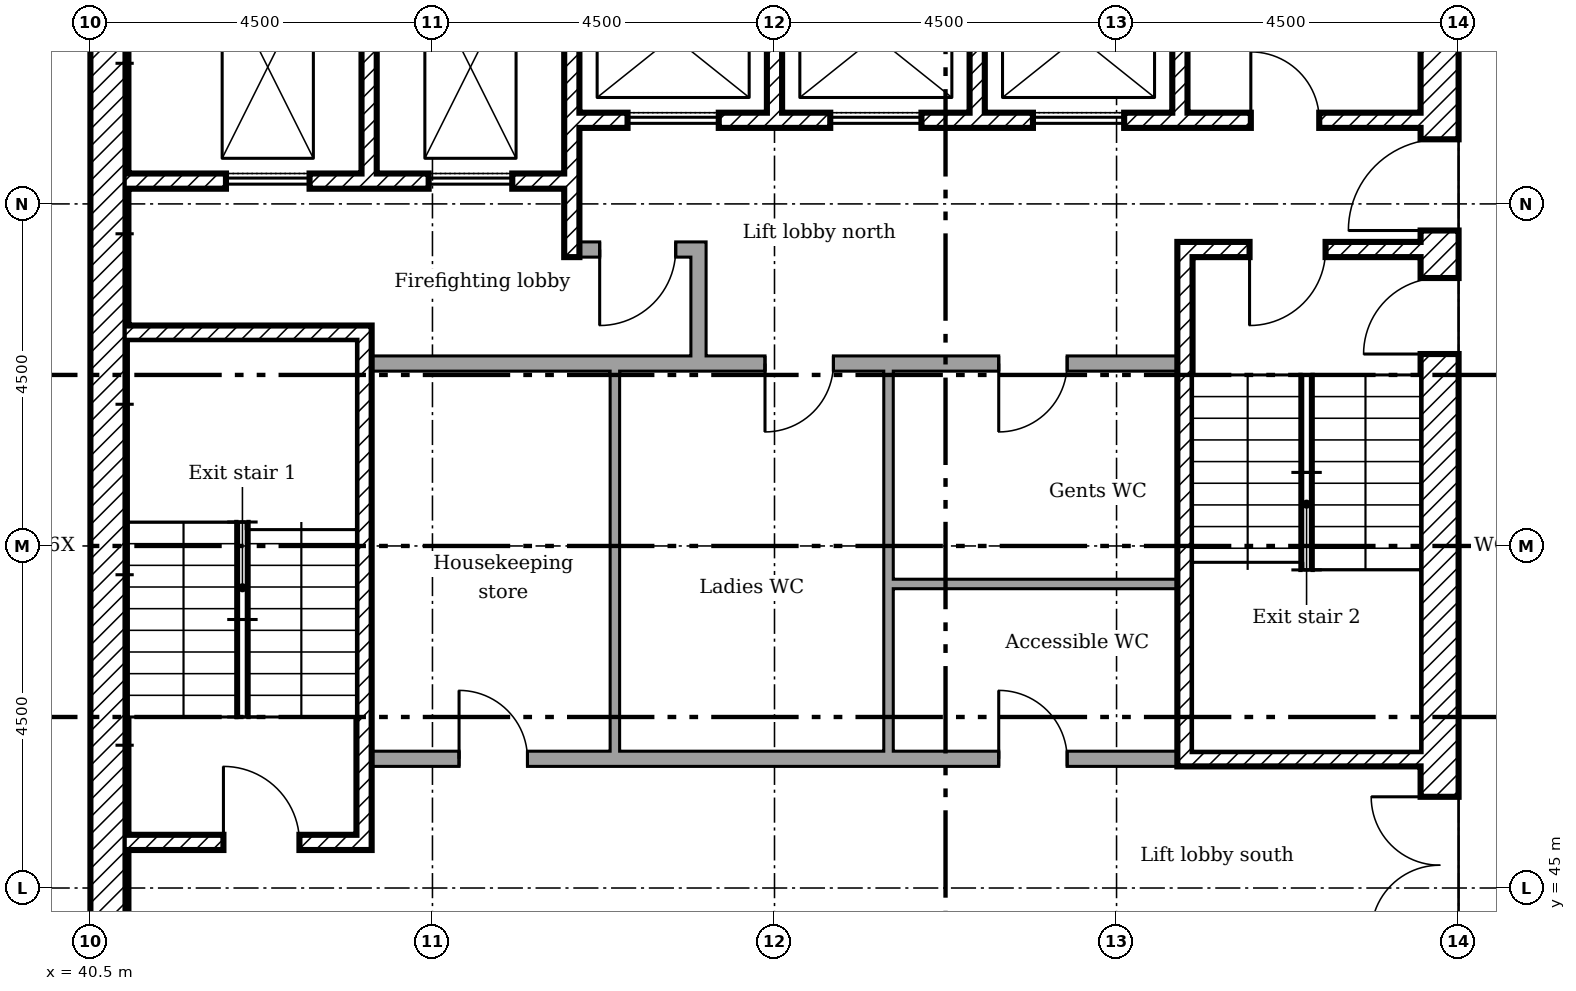
"""IFC4 building model, lengths in metres.
Left out: names, types, materials, properties, quantities, classifications, styles, units other than length and angle.
Written with IfcOpenShell. Run it as: python <this file> out.ifc"""

import sys

from ifc_helpers import new_model, si_unit, direction, frame, frame_2d, origin, place, context, subcontext, project, spatial, rectangle, extrude, element, fill, save


model = new_model("IFC4")
c1 = context("Model", 3, precision=1e-05, world=origin(), true_north=direction((0.0, 1.0)))
c2 = subcontext(c1, "Body", "Model", "MODEL_VIEW")
j1 = project(units=[si_unit("LENGTHUNIT", "METRE"), si_unit("PLANEANGLEUNIT", "RADIAN")], contexts=[c1])
p1 = place(None, origin())
s1 = spatial("IfcSite", under=j1, at=p1, CompositionType="ELEMENT")
p2 = place(p1, origin())
s2 = spatial("IfcBuilding", under=s1, at=p2, CompositionType="ELEMENT")
p3 = place(p2, frame((0.0, 0.0, 235.2)))
s3 = spatial("IfcBuildingStorey", under=s2, at=p3, CompositionType="ELEMENT", Elevation=235.2)
p4 = place(p3, frame((58.25, 40.5, 0.0), z_axis=(0.0, 0.0, 1.0), x_axis=(0.0, 1.0, 0.0)))
e1 = element("IfcWall", 1, at=p4, inside=s3, PredefinedType="SHEAR", context=c2, shape_type="SweptSolid", body=[
    extrude(rectangle(XDim=18.0, YDim=0.5, at=frame_2d((9.0, 0.0))), origin(), (0.0, 0.0, 1.0), 3.35),
])
p5 = place(p4, frame((13.15, 0.0, 0.0)))
e2 = element("IfcOpeningElement", 2, at=p5, cuts=e1, PredefinedType="OPENING", context=c2, shape_type="SweptSolid", body=[
    extrude(rectangle(XDim=1.2, YDim=2.1, at=frame_2d((0.6, 1.05))), frame((0.0, 0.26, 0.0), z_axis=(0.0, -1.0, 0.0), x_axis=(1.0, 0.0, 0.0)), (0.0, 0.0, 1.0), 0.52),
])
p6 = place(p4, frame((3.9, 0.0, 0.0)))
e3 = element("IfcOpeningElement", 3, at=p6, cuts=e1, PredefinedType="OPENING", context=c2, shape_type="SweptSolid", body=[
    extrude(rectangle(XDim=1.8, YDim=2.1, at=frame_2d((0.9, 1.05))), frame((0.0, 0.26, 0.0), z_axis=(0.0, -1.0, 0.0), x_axis=(1.0, 0.0, 0.0)), (0.0, 0.0, 1.0), 0.52),
])
p7 = place(p4, frame((11.525, 0.0, 0.0)))
e4 = element("IfcOpeningElement", 4, at=p7, cuts=e1, PredefinedType="OPENING", context=c2, shape_type="SweptSolid", body=[
    extrude(rectangle(XDim=1.0, YDim=2.1, at=frame_2d((0.5, 1.05))), frame((0.0, 0.26, 0.0), z_axis=(0.0, -1.0, 0.0), x_axis=(1.0, 0.0, 0.0)), (0.0, 0.0, 1.0), 0.52),
])
p8 = place(p3, frame((40.75, 41.0, 0.0), z_axis=(0.0, 0.0, 1.0), x_axis=(0.0, 1.0, 0.0)))
e5 = element("IfcWall", 5, at=p8, inside=s3, PredefinedType="SHEAR", context=c2, shape_type="SweptSolid", body=[
    extrude(rectangle(XDim=17.0, YDim=0.5, at=frame_2d((8.5, 0.0))), origin(), (0.0, 0.0, 1.0), 3.35),
])
p9 = place(p3, frame((44.167, 58.0, 0.0), z_axis=(0.0, 0.0, 1.0), x_axis=(0.0, -1.0, 0.0)))
e6 = element("IfcWall", 6, at=p9, inside=s3, PredefinedType="SHEAR", context=c2, shape_type="SweptSolid", body=[
    extrude(rectangle(XDim=3.6, YDim=0.2, at=frame_2d((1.8, 0.0))), origin(), (0.0, 0.0, 1.0), 3.35),
])
p10 = place(p3, frame((46.833, 58.0, 0.0), z_axis=(0.0, 0.0, 1.0), x_axis=(0.0, -1.0, 0.0)))
e7 = element("IfcWall", 7, at=p10, inside=s3, PredefinedType="SHEAR", context=c2, shape_type="SweptSolid", body=[
    extrude(rectangle(XDim=4.7, YDim=0.2, at=frame_2d((2.35, 0.0))), origin(), (0.0, 0.0, 1.0), 3.35),
])
for number, where, z_axis, x_axis in (
    (8, (49.5, 58.0, 0.0), (0.0, 0.0, 1.0), (0.0, -1.0, 0.0)),
    (9, (52.167, 58.0, 0.0), (0.0, 0.0, 1.0), (0.0, -1.0, 0.0)),
    (10, (54.833, 58.0, 0.0), (0.0, 0.0, 1.0), (0.0, -1.0, 0.0)),
):
    element("IfcWall", number, at=place(p3, frame(where, z_axis=z_axis, x_axis=x_axis)), inside=s3, PredefinedType="SHEAR", context=c2, shape_type="SweptSolid", body=[
        extrude(rectangle(XDim=2.8, YDim=0.2, at=frame_2d((1.4, 0.0))), origin(), (0.0, 0.0, 1.0), 3.35),
    ])
p11 = place(p3, frame((48.5, 51.9, 0.0), z_axis=(0.0, 0.0, 1.0), x_axis=(0.0, 1.0, 0.0)))
e11 = element("IfcWall", 11, at=p11, inside=s3, PredefinedType="PARTITIONING", context=c2, shape_type="SweptSolid", body=[
    extrude(rectangle(XDim=1.6, YDim=0.2, at=frame_2d((0.8, 0.0))), origin(), (0.0, 0.0, 1.0), 3.35),
])
p12 = place(p3, frame((46.933, 53.4, 0.0)))
e12 = element("IfcWall", 12, at=p12, inside=s3, PredefinedType="PARTITIONING", context=c2, shape_type="SweptSolid", body=[
    extrude(rectangle(XDim=1.467, YDim=0.2, at=frame_2d((0.733, 0.0))), origin(), (0.0, 0.0, 1.0), 3.35),
])
p13 = place(p12, frame((0.267, 0.0, 0.0)))
e13 = element("IfcOpeningElement", 13, at=p13, cuts=e12, PredefinedType="OPENING", context=c2, shape_type="SweptSolid", body=[
    extrude(rectangle(XDim=1.0, YDim=2.1, at=frame_2d((0.5, 1.05))), frame((0.0, 0.11, 0.0), z_axis=(0.0, -1.0, 0.0), x_axis=(1.0, 0.0, 0.0)), (0.0, 0.0, 1.0), 0.22),
])
p14 = place(p3, frame((46.933, 55.1, 0.0)))
e14 = element("IfcWall", 14, at=p14, inside=s3, PredefinedType="SHEAR", context=c2, shape_type="SweptSolid", body=[
    extrude(rectangle(XDim=11.067, YDim=0.2, at=frame_2d((5.533, 0.0))), origin(), (0.0, 0.0, 1.0), 3.35),
])
p15 = place(p14, frame((8.833, 0.0, 0.0)))
e15 = element("IfcOpeningElement", 15, at=p15, cuts=e14, PredefinedType="OPENING", context=c2, shape_type="SweptSolid", body=[
    extrude(rectangle(XDim=0.9, YDim=2.1, at=frame_2d((0.45, 1.05))), frame((0.0, 0.11, 0.0), z_axis=(0.0, -1.0, 0.0), x_axis=(1.0, 0.0, 0.0)), (0.0, 0.0, 1.0), 0.22),
])
p16 = place(p14, frame((0.633, 0.0, 0.0)))
e16 = element("IfcOpeningElement", 16, at=p16, cuts=e14, PredefinedType="OPENING", context=c2, shape_type="SweptSolid", body=[
    extrude(rectangle(XDim=1.2, YDim=2.1, at=frame_2d((0.6, 1.05))), frame((0.0, 0.11, 0.0), z_axis=(0.0, -1.0, 0.0), x_axis=(1.0, 0.0, 0.0)), (0.0, 0.0, 1.0), 0.22),
])
p17 = place(p14, frame((3.3, 0.0, 0.0)))
e17 = element("IfcOpeningElement", 17, at=p17, cuts=e14, PredefinedType="OPENING", context=c2, shape_type="SweptSolid", body=[
    extrude(rectangle(XDim=1.2, YDim=2.1, at=frame_2d((0.6, 1.05))), frame((0.0, 0.11, 0.0), z_axis=(0.0, -1.0, 0.0), x_axis=(1.0, 0.0, 0.0)), (0.0, 0.0, 1.0), 0.22),
])
p18 = place(p14, frame((5.967, 0.0, 0.0)))
e18 = element("IfcOpeningElement", 18, at=p18, cuts=e14, PredefinedType="OPENING", context=c2, shape_type="SweptSolid", body=[
    extrude(rectangle(XDim=1.2, YDim=2.1, at=frame_2d((0.6, 1.05))), frame((0.0, 0.11, 0.0), z_axis=(0.0, -1.0, 0.0), x_axis=(1.0, 0.0, 0.0)), (0.0, 0.0, 1.0), 0.22),
])
p19 = place(p3, frame((41.0, 54.3, 0.0)))
e19 = element("IfcWall", 19, at=p19, inside=s3, PredefinedType="SHEAR", context=c2, shape_type="SweptSolid", body=[
    extrude(rectangle(XDim=5.733, YDim=0.2, at=frame_2d((2.867, 0.0))), origin(), (0.0, 0.0, 1.0), 3.35),
])
p20 = place(p19, frame((1.283, 0.0, 0.0)))
e20 = element("IfcOpeningElement", 20, at=p20, cuts=e19, PredefinedType="OPENING", context=c2, shape_type="SweptSolid", body=[
    extrude(rectangle(XDim=1.1, YDim=2.1, at=frame_2d((0.55, 1.05))), frame((0.0, 0.11, 0.0), z_axis=(0.0, -1.0, 0.0), x_axis=(1.0, 0.0, 0.0)), (0.0, 0.0, 1.0), 0.22),
])
p21 = place(p19, frame((3.95, 0.0, 0.0)))
e21 = element("IfcOpeningElement", 21, at=p21, cuts=e19, PredefinedType="OPENING", context=c2, shape_type="SweptSolid", body=[
    extrude(rectangle(XDim=1.1, YDim=2.1, at=frame_2d((0.55, 1.05))), frame((0.0, 0.11, 0.0), z_axis=(0.0, -1.0, 0.0), x_axis=(1.0, 0.0, 0.0)), (0.0, 0.0, 1.0), 0.22),
])
p22 = place(p3, frame((44.1, 45.5, 0.0), z_axis=(0.0, 0.0, 1.0), x_axis=(0.0, 1.0, 0.0)))
e22 = element("IfcWall", 22, at=p22, inside=s3, PredefinedType="SHEAR", context=c2, shape_type="SweptSolid", body=[
    extrude(rectangle(XDim=6.9, YDim=0.2, at=frame_2d((3.45, 0.0))), origin(), (0.0, 0.0, 1.0), 3.35),
])
p23 = place(p3, frame((41.0, 52.3, 0.0)))
e23 = element("IfcWall", 23, at=p23, inside=s3, PredefinedType="SHEAR", context=c2, shape_type="SweptSolid", body=[
    extrude(rectangle(XDim=3.0, YDim=0.2, at=frame_2d((1.5, 0.0))), origin(), (0.0, 0.0, 1.0), 3.35),
])
p24 = place(p3, frame((41.0, 45.6, 0.0)))
e24 = element("IfcWall", 24, at=p24, inside=s3, PredefinedType="SHEAR", context=c2, shape_type="SweptSolid", body=[
    extrude(rectangle(XDim=3.0, YDim=0.2, at=frame_2d((1.5, 0.0))), origin(), (0.0, 0.0, 1.0), 3.35),
])
p25 = place(p24, frame((1.25, 0.0, 0.0)))
e25 = element("IfcOpeningElement", 25, at=p25, cuts=e24, PredefinedType="OPENING", context=c2, shape_type="SweptSolid", body=[
    extrude(rectangle(XDim=1.0, YDim=2.1, at=frame_2d((0.5, 1.05))), frame((0.0, 0.11, 0.0), z_axis=(0.0, -1.0, 0.0), x_axis=(1.0, 0.0, 0.0)), (0.0, 0.0, 1.0), 0.22),
])
p26 = place(p3, frame((54.8, 53.4, 0.0)))
e26 = element("IfcWall", 26, at=p26, inside=s3, PredefinedType="SHEAR", context=c2, shape_type="SweptSolid", body=[
    extrude(rectangle(XDim=3.2, YDim=0.2, at=frame_2d((1.6, 0.0))), origin(), (0.0, 0.0, 1.0), 3.35),
])
p27 = place(p26, frame((0.95, 0.0, 0.0)))
e27 = element("IfcOpeningElement", 27, at=p27, cuts=e26, PredefinedType="OPENING", context=c2, shape_type="SweptSolid", body=[
    extrude(rectangle(XDim=1.0, YDim=2.1, at=frame_2d((0.5, 1.05))), frame((0.0, 0.11, 0.0), z_axis=(0.0, -1.0, 0.0), x_axis=(1.0, 0.0, 0.0)), (0.0, 0.0, 1.0), 0.22),
])
p28 = place(p3, frame((54.8, 46.7, 0.0)))
e28 = element("IfcWall", 28, at=p28, inside=s3, PredefinedType="SHEAR", context=c2, shape_type="SweptSolid", body=[
    extrude(rectangle(XDim=3.2, YDim=0.2, at=frame_2d((1.6, 0.0))), origin(), (0.0, 0.0, 1.0), 3.35),
])
p29 = place(p3, frame((54.9, 46.8, 0.0), z_axis=(0.0, 0.0, 1.0), x_axis=(0.0, 1.0, 0.0)))
e29 = element("IfcWall", 29, at=p29, inside=s3, PredefinedType="SHEAR", context=c2, shape_type="SweptSolid", body=[
    extrude(rectangle(XDim=6.5, YDim=0.2, at=frame_2d((3.25, 0.0))), origin(), (0.0, 0.0, 1.0), 3.35),
])
p30 = place(p3, frame((44.2, 51.9, 0.0)))
e30 = element("IfcWall", 30, at=p30, inside=s3, PredefinedType="PARTITIONING", context=c2, shape_type="SweptSolid", body=[
    extrude(rectangle(XDim=10.6, YDim=0.2, at=frame_2d((5.3, 0.0))), origin(), (0.0, 0.0, 1.0), 3.35),
])
p31 = place(p30, frame((5.175, 0.0, 0.0)))
e31 = element("IfcOpeningElement", 31, at=p31, cuts=e30, PredefinedType="OPENING", context=c2, shape_type="SweptSolid", body=[
    extrude(rectangle(XDim=0.9, YDim=2.1, at=frame_2d((0.45, 1.05))), frame((0.0, 0.11, 0.0), z_axis=(0.0, -1.0, 0.0), x_axis=(1.0, 0.0, 0.0)), (0.0, 0.0, 1.0), 0.22),
])
p32 = place(p30, frame((8.25, 0.0, 0.0)))
e32 = element("IfcOpeningElement", 32, at=p32, cuts=e30, PredefinedType="OPENING", context=c2, shape_type="SweptSolid", body=[
    extrude(rectangle(XDim=0.9, YDim=2.1, at=frame_2d((0.45, 1.05))), frame((0.0, 0.11, 0.0), z_axis=(0.0, -1.0, 0.0), x_axis=(1.0, 0.0, 0.0)), (0.0, 0.0, 1.0), 0.22),
])
p33 = place(p3, frame((44.2, 46.7, 0.0)))
e33 = element("IfcWall", 33, at=p33, inside=s3, PredefinedType="PARTITIONING", context=c2, shape_type="SweptSolid", body=[
    extrude(rectangle(XDim=10.6, YDim=0.2, at=frame_2d((5.3, 0.0))), origin(), (0.0, 0.0, 1.0), 3.35),
])
p34 = place(p33, frame((1.15, 0.0, 0.0)))
e34 = element("IfcOpeningElement", 34, at=p34, cuts=e33, PredefinedType="OPENING", context=c2, shape_type="SweptSolid", body=[
    extrude(rectangle(XDim=0.9, YDim=2.1, at=frame_2d((0.45, 1.05))), frame((0.0, 0.11, 0.0), z_axis=(0.0, -1.0, 0.0), x_axis=(1.0, 0.0, 0.0)), (0.0, 0.0, 1.0), 0.22),
])
p35 = place(p33, frame((8.25, 0.0, 0.0)))
e35 = element("IfcOpeningElement", 35, at=p35, cuts=e33, PredefinedType="OPENING", context=c2, shape_type="SweptSolid", body=[
    extrude(rectangle(XDim=0.9, YDim=2.1, at=frame_2d((0.45, 1.05))), frame((0.0, 0.11, 0.0), z_axis=(0.0, -1.0, 0.0), x_axis=(1.0, 0.0, 0.0)), (0.0, 0.0, 1.0), 0.22),
])
p36 = place(p3, frame((47.4, 46.8, 0.0), z_axis=(0.0, 0.0, 1.0), x_axis=(0.0, 1.0, 0.0)))
e36 = element("IfcWall", 36, at=p36, inside=s3, PredefinedType="PARTITIONING", context=c2, shape_type="SweptSolid", body=[
    extrude(rectangle(XDim=5.0, YDim=0.125, at=frame_2d((2.5, 0.0))), origin(), (0.0, 0.0, 1.0), 3.35),
])
p37 = place(p3, frame((51.0, 46.8, 0.0), z_axis=(0.0, 0.0, 1.0), x_axis=(0.0, 1.0, 0.0)))
e37 = element("IfcWall", 37, at=p37, inside=s3, PredefinedType="PARTITIONING", context=c2, shape_type="SweptSolid", body=[
    extrude(rectangle(XDim=2.262, YDim=0.125, at=frame_2d((1.131, 0.0))), origin(), (0.0, 0.0, 1.0), 3.35),
])
p38 = place(p3, frame((54.8, 49.0, 0.0), z_axis=(0.0, 0.0, 1.0), x_axis=(-1.0, 0.0, 0.0)))
e38 = element("IfcWall", 38, at=p38, inside=s3, PredefinedType="PARTITIONING", context=c2, shape_type="SweptSolid", body=[
    extrude(rectangle(XDim=3.738, YDim=0.125, at=frame_2d((1.869, 0.0))), origin(), (0.0, 0.0, 1.0), 3.35),
])
p39 = place(p3, frame((51.0, 49.0, 0.0), z_axis=(0.0, 0.0, 1.0), x_axis=(0.0, 1.0, 0.0)))
e39 = element("IfcWall", 39, at=p39, inside=s3, PredefinedType="PARTITIONING", context=c2, shape_type="SweptSolid", body=[
    extrude(rectangle(XDim=2.8, YDim=0.125, at=frame_2d((1.4, 0.0))), origin(), (0.0, 0.0, 1.0), 3.35),
])
p40 = place(p5, origin())
e40 = element("IfcDoor", 40, at=p40, inside=s3, OperationType="SINGLE_SWING_RIGHT", PredefinedType="DOOR", context=c2, shape_type="SweptSolid", body=[
    extrude(rectangle(XDim=1.2, YDim=2.1, at=frame_2d((0.6, 1.05))), frame((0.0, 0.025, 0.0), z_axis=(0.0, -1.0, 0.0), x_axis=(1.0, 0.0, 0.0)), (0.0, 0.0, 1.0), 0.05),
])
fill(e2, e40)
p41 = place(p6, origin())
e41 = element("IfcDoor", 41, at=p41, inside=s3, OperationType="DOUBLE_DOOR_SINGLE_SWING", PredefinedType="DOOR", context=c2, shape_type="SweptSolid", body=[
    extrude(rectangle(XDim=1.8, YDim=2.1, at=frame_2d((0.9, 1.05))), frame((0.0, 0.025, 0.0), z_axis=(0.0, -1.0, 0.0), x_axis=(1.0, 0.0, 0.0)), (0.0, 0.0, 1.0), 0.05),
])
fill(e3, e41)
p42 = place(p25, origin())
e42 = element("IfcDoor", 42, at=p42, inside=s3, OperationType="SINGLE_SWING_RIGHT", PredefinedType="DOOR", context=c2, shape_type="SweptSolid", body=[
    extrude(rectangle(XDim=1.0, YDim=2.1, at=frame_2d((0.5, 1.05))), frame((0.0, 0.025, 0.0), z_axis=(0.0, -1.0, 0.0), x_axis=(1.0, 0.0, 0.0)), (0.0, 0.0, 1.0), 0.05),
])
fill(e25, e42)
p43 = place(p27, frame((1.0, 0.0, 0.0), x_axis=(-1.0, 0.0, 0.0)))
e43 = element("IfcDoor", 43, at=p43, inside=s3, OperationType="SINGLE_SWING_LEFT", PredefinedType="DOOR", context=c2, shape_type="SweptSolid", body=[
    extrude(rectangle(XDim=1.0, YDim=2.1, at=frame_2d((0.5, 1.05))), frame((0.0, 0.025, 0.0), z_axis=(0.0, -1.0, 0.0), x_axis=(1.0, 0.0, 0.0)), (0.0, 0.0, 1.0), 0.05),
])
fill(e27, e43)
p44 = place(p7, origin())
e44 = element("IfcDoor", 44, at=p44, inside=s3, OperationType="SINGLE_SWING_RIGHT", PredefinedType="DOOR", context=c2, shape_type="SweptSolid", body=[
    extrude(rectangle(XDim=1.0, YDim=2.1, at=frame_2d((0.5, 1.05))), frame((0.0, 0.025, 0.0), z_axis=(0.0, -1.0, 0.0), x_axis=(1.0, 0.0, 0.0)), (0.0, 0.0, 1.0), 0.05),
])
fill(e4, e44)
p45 = place(p13, frame((1.0, 0.0, 0.0), x_axis=(-1.0, 0.0, 0.0)))
e45 = element("IfcDoor", 45, at=p45, inside=s3, OperationType="SINGLE_SWING_LEFT", PredefinedType="DOOR", context=c2, shape_type="SweptSolid", body=[
    extrude(rectangle(XDim=1.0, YDim=2.1, at=frame_2d((0.5, 1.05))), frame((0.0, 0.025, 0.0), z_axis=(0.0, -1.0, 0.0), x_axis=(1.0, 0.0, 0.0)), (0.0, 0.0, 1.0), 0.05),
])
fill(e13, e45)
p46 = place(p15, origin())
e46 = element("IfcDoor", 46, at=p46, inside=s3, OperationType="SINGLE_SWING_RIGHT", PredefinedType="DOOR", context=c2, shape_type="SweptSolid", body=[
    extrude(rectangle(XDim=0.9, YDim=2.1, at=frame_2d((0.45, 1.05))), frame((0.0, 0.025, 0.0), z_axis=(0.0, -1.0, 0.0), x_axis=(1.0, 0.0, 0.0)), (0.0, 0.0, 1.0), 0.05),
])
fill(e15, e46)
p47 = place(p34, origin())
e47 = element("IfcDoor", 47, at=p47, inside=s3, OperationType="SINGLE_SWING_RIGHT", PredefinedType="DOOR", context=c2, shape_type="SweptSolid", body=[
    extrude(rectangle(XDim=0.9, YDim=2.1, at=frame_2d((0.45, 1.05))), frame((0.0, 0.025, 0.0), z_axis=(0.0, -1.0, 0.0), x_axis=(1.0, 0.0, 0.0)), (0.0, 0.0, 1.0), 0.05),
])
fill(e34, e47)
p48 = place(p31, frame((0.9, 0.0, 0.0), x_axis=(-1.0, 0.0, 0.0)))
e48 = element("IfcDoor", 48, at=p48, inside=s3, OperationType="SINGLE_SWING_LEFT", PredefinedType="DOOR", context=c2, shape_type="SweptSolid", body=[
    extrude(rectangle(XDim=0.9, YDim=2.1, at=frame_2d((0.45, 1.05))), frame((0.0, 0.025, 0.0), z_axis=(0.0, -1.0, 0.0), x_axis=(1.0, 0.0, 0.0)), (0.0, 0.0, 1.0), 0.05),
])
fill(e31, e48)
p49 = place(p35, origin())
e49 = element("IfcDoor", 49, at=p49, inside=s3, OperationType="SINGLE_SWING_RIGHT", PredefinedType="DOOR", context=c2, shape_type="SweptSolid", body=[
    extrude(rectangle(XDim=0.9, YDim=2.1, at=frame_2d((0.45, 1.05))), frame((0.0, 0.025, 0.0), z_axis=(0.0, -1.0, 0.0), x_axis=(1.0, 0.0, 0.0)), (0.0, 0.0, 1.0), 0.05),
])
fill(e35, e49)
p50 = place(p32, frame((0.9, 0.0, 0.0), x_axis=(-1.0, 0.0, 0.0)))
e50 = element("IfcDoor", 50, at=p50, inside=s3, OperationType="SINGLE_SWING_LEFT", PredefinedType="DOOR", context=c2, shape_type="SweptSolid", body=[
    extrude(rectangle(XDim=0.9, YDim=2.1, at=frame_2d((0.45, 1.05))), frame((0.0, 0.025, 0.0), z_axis=(0.0, -1.0, 0.0), x_axis=(1.0, 0.0, 0.0)), (0.0, 0.0, 1.0), 0.05),
])
fill(e32, e50)
p51 = place(p20, origin())
e51 = element("IfcDoor", 51, at=p51, inside=s3, OperationType="SLIDING_TO_LEFT", PredefinedType="DOOR", context=c2, shape_type="SweptSolid", body=[
    extrude(rectangle(XDim=1.1, YDim=2.1, at=frame_2d((0.55, 1.05))), frame((0.0, 0.025, 0.0), z_axis=(0.0, -1.0, 0.0), x_axis=(1.0, 0.0, 0.0)), (0.0, 0.0, 1.0), 0.05),
])
fill(e20, e51)
p52 = place(p21, origin())
e52 = element("IfcDoor", 52, at=p52, inside=s3, OperationType="SLIDING_TO_LEFT", PredefinedType="DOOR", context=c2, shape_type="SweptSolid", body=[
    extrude(rectangle(XDim=1.1, YDim=2.1, at=frame_2d((0.55, 1.05))), frame((0.0, 0.025, 0.0), z_axis=(0.0, -1.0, 0.0), x_axis=(1.0, 0.0, 0.0)), (0.0, 0.0, 1.0), 0.05),
])
fill(e21, e52)
p53 = place(p16, origin())
e53 = element("IfcDoor", 53, at=p53, inside=s3, OperationType="SLIDING_TO_LEFT", PredefinedType="DOOR", context=c2, shape_type="SweptSolid", body=[
    extrude(rectangle(XDim=1.2, YDim=2.1, at=frame_2d((0.6, 1.05))), frame((0.0, 0.025, 0.0), z_axis=(0.0, -1.0, 0.0), x_axis=(1.0, 0.0, 0.0)), (0.0, 0.0, 1.0), 0.05),
])
fill(e16, e53)
p54 = place(p17, origin())
e54 = element("IfcDoor", 54, at=p54, inside=s3, OperationType="SLIDING_TO_LEFT", PredefinedType="DOOR", context=c2, shape_type="SweptSolid", body=[
    extrude(rectangle(XDim=1.2, YDim=2.1, at=frame_2d((0.6, 1.05))), frame((0.0, 0.025, 0.0), z_axis=(0.0, -1.0, 0.0), x_axis=(1.0, 0.0, 0.0)), (0.0, 0.0, 1.0), 0.05),
])
fill(e17, e54)
p55 = place(p18, origin())
e55 = element("IfcDoor", 55, at=p55, inside=s3, OperationType="SLIDING_TO_LEFT", PredefinedType="DOOR", context=c2, shape_type="SweptSolid", body=[
    extrude(rectangle(XDim=1.2, YDim=2.1, at=frame_2d((0.6, 1.05))), frame((0.0, 0.025, 0.0), z_axis=(0.0, -1.0, 0.0), x_axis=(1.0, 0.0, 0.0)), (0.0, 0.0, 1.0), 0.05),
])
fill(e18, e55)
save(model, sys.argv[1])
